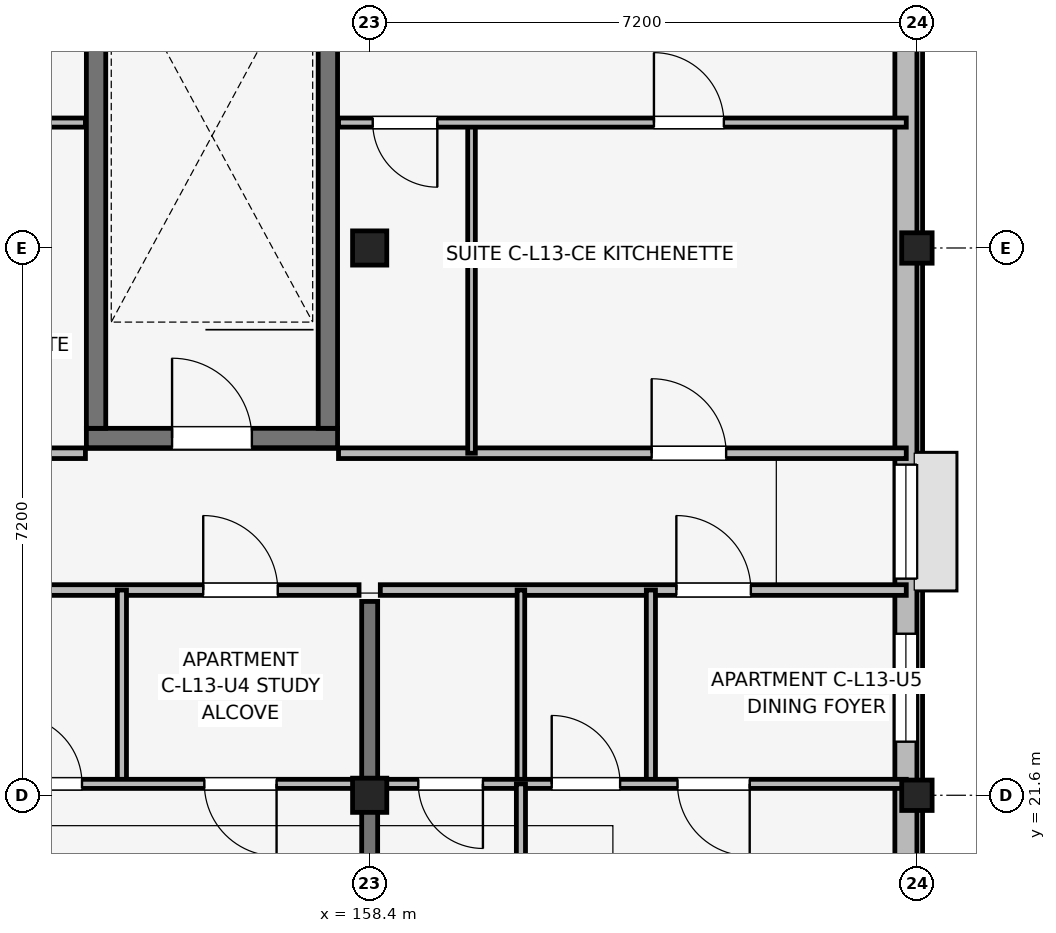
"""IFC4 building model, lengths in metres.
Left out: names, types, materials, properties, quantities, classifications, styles, units other than length and angle.
Written with IfcOpenShell. Run it as: python <this file> out.ifc"""

import sys

from ifc_helpers import new_model, si_unit, direction, frame, frame_2d, origin, origin_2d, place, context, subcontext, project, spatial, rectangle, extrude, element, fill, save


model = new_model("IFC4")
c1 = context("Model", 3, precision=1e-05, world=origin(), true_north=direction((0.0, 1.0)))
c2 = subcontext(c1, "Body", "Model", "MODEL_VIEW")
j1 = project(units=[si_unit("LENGTHUNIT", "METRE"), si_unit("PLANEANGLEUNIT", "RADIAN")], contexts=[c1])
p1 = place(None, origin())
s1 = spatial("IfcSite", under=j1, at=p1, CompositionType="ELEMENT")
p2 = place(p1, origin())
s2 = spatial("IfcBuilding", under=s1, at=p2, CompositionType="ELEMENT")
p3 = place(p2, frame((0.0, 0.0, 43.35)))
s3 = spatial("IfcBuildingStorey", under=s2, at=p3, CompositionType="ELEMENT", Elevation=43.35)
for number, where, z_axis, x_axis in (
    (1, (158.4, 21.6, 0.0), (0.0, 0.0, 1.0), (1.0, 0.0, 0.0)),
    (2, (158.4, 28.8, 0.0), (0.0, 0.0, 1.0), (1.0, 0.0, 0.0)),
):
    element("IfcColumn", number, at=place(p3, frame(where, z_axis=z_axis, x_axis=x_axis)), inside=s3, PredefinedType="COLUMN", context=c2, shape_type="SweptSolid", body=[
        extrude(rectangle(XDim=0.45, YDim=0.45, at=origin_2d()), origin(), (0.0, 0.0, 1.0), 3.15),
    ])
for number, where, z_axis, x_axis in (
    (3, (165.6, 21.6, 0.0), (0.0, 0.0, 1.0), (1.0, 0.0, 0.0)),
    (4, (165.6, 28.8, 0.0), (0.0, 0.0, 1.0), (1.0, 0.0, 0.0)),
):
    element("IfcColumn", number, at=place(p3, frame(where, z_axis=z_axis, x_axis=x_axis)), inside=s3, PredefinedType="COLUMN", context=c2, shape_type="SweptSolid", body=[
        extrude(rectangle(XDim=0.4, YDim=0.4, at=origin_2d()), origin(), (0.0, 0.0, 1.0), 3.15),
    ])
p4 = place(p3, frame((154.673, 26.3, 0.0), z_axis=(0.0, 0.0, 1.0), x_axis=(1.0, 0.0, 0.0)))
e5 = element("IfcWall", 5, at=p4, inside=s3, PredefinedType="SHEAR", context=c2, shape_type="SweptSolid", body=[
    extrude(rectangle(XDim=3.305, YDim=0.255, at=frame_2d((1.652, 0.0))), origin(), (0.0, 0.0, 1.0), 3.15),
])
p5 = place(p4, frame((1.127, 0.0, 0.0)))
e6 = element("IfcOpeningElement", 6, at=p5, cuts=e5, PredefinedType="OPENING", context=c2, shape_type="SweptSolid", body=[
    extrude(rectangle(XDim=1.05, YDim=2.12, at=frame_2d((0.525, 1.06))), frame((0.0, 0.137, 0.0), z_axis=(0.0, -1.0, 0.0), x_axis=(1.0, 0.0, 0.0)), (0.0, 0.0, 1.0), 0.275),
])
for number, where, z_axis, x_axis in (
    (7, (154.8, 26.427, 0.0), (0.0, 0.0, 1.0), (0.0, 1.0, 0.0)),
    (8, (157.85, 26.427, 0.0), (0.0, 0.0, 1.0), (0.0, 1.0, 0.0)),
):
    element("IfcWall", number, at=place(p3, frame(where, z_axis=z_axis, x_axis=x_axis)), inside=s3, PredefinedType="SHEAR", context=c2, shape_type="SweptSolid", body=[
        extrude(rectangle(XDim=6.295, YDim=0.255, at=frame_2d((3.147, 0.0))), origin(), (0.0, 0.0, 1.0), 3.15),
    ])
p6 = place(p3, frame((158.4, 17.75, 0.0), z_axis=(0.0, 0.0, 1.0), x_axis=(0.0, 1.0, 0.0)))
e9 = element("IfcWall", 9, at=p6, inside=s3, PredefinedType="SHEAR", context=c2, shape_type="SweptSolid", body=[
    extrude(rectangle(XDim=6.4, YDim=0.21, at=frame_2d((3.2, 0.0))), origin(), (0.0, 0.0, 1.0), 3.15),
])
p7 = place(p3, frame((165.455, 19.6, 0.0), z_axis=(0.0, 0.0, 1.0), x_axis=(0.0, 1.0, 0.0)))
e10 = element("IfcWall", 10, at=p7, inside=s3, PredefinedType="SOLIDWALL", context=c2, shape_type="SweptSolid", body=[
    extrude(rectangle(XDim=14.2, YDim=0.29, at=frame_2d((7.1, 0.0))), origin(), (0.0, 0.0, 1.0), 2.51),
])
p8 = place(p7, frame((4.85, 0.0, 1.05)))
e11 = element("IfcOpeningElement", 11, at=p8, cuts=e10, PredefinedType="OPENING", context=c2, shape_type="SweptSolid", body=[
    extrude(rectangle(XDim=1.5, YDim=1.15, at=frame_2d((0.75, 0.575))), frame((0.0, 0.155, 0.0), z_axis=(0.0, -1.0, 0.0), x_axis=(1.0, 0.0, 0.0)), (0.0, 0.0, 1.0), 0.31),
])
p9 = place(p7, frame((2.705, 0.0, 0.75)))
e12 = element("IfcOpeningElement", 12, at=p9, cuts=e10, PredefinedType="OPENING", context=c2, shape_type="SweptSolid", body=[
    extrude(rectangle(XDim=1.42, YDim=1.6, at=frame_2d((0.71, 0.8))), frame((0.0, 0.155, 0.0), z_axis=(0.0, -1.0, 0.0), x_axis=(1.0, 0.0, 0.0)), (0.0, 0.0, 1.0), 0.31),
])
p10 = place(p3, frame((151.34, 24.3, 0.0), z_axis=(0.0, 0.0, 1.0), x_axis=(1.0, 0.0, 0.0)))
e13 = element("IfcWall", 13, at=p10, inside=s3, PredefinedType="PARTITIONING", context=c2, shape_type="SweptSolid", body=[
    extrude(rectangle(XDim=6.92, YDim=0.14, at=frame_2d((3.46, 0.0))), origin(), (0.0, 0.0, 1.0), 2.38),
])
p11 = place(p10, frame((4.87, 0.0, 0.0)))
e14 = element("IfcOpeningElement", 14, at=p11, cuts=e13, PredefinedType="OPENING", context=c2, shape_type="SweptSolid", body=[
    extrude(rectangle(XDim=0.98, YDim=2.1, at=frame_2d((0.49, 1.05))), frame((0.0, 0.08, 0.0), z_axis=(0.0, -1.0, 0.0), x_axis=(1.0, 0.0, 0.0)), (0.0, 0.0, 1.0), 0.16),
])
p12 = place(p3, frame((155.14, 21.75, 0.0), z_axis=(0.0, 0.0, 1.0), x_axis=(0.0, 1.0, 0.0)))
e15 = element("IfcWall", 15, at=p12, inside=s3, PredefinedType="PARTITIONING", context=c2, shape_type="SweptSolid", body=[
    extrude(rectangle(XDim=2.55, YDim=0.12, at=frame_2d((1.275, 0.0))), origin(), (0.0, 0.0, 1.0), 2.38),
])
p13 = place(p3, frame((151.34, 21.75, 0.0), z_axis=(0.0, 0.0, 1.0), x_axis=(1.0, 0.0, 0.0)))
e16 = element("IfcWall", 16, at=p13, inside=s3, PredefinedType="PARTITIONING", context=c2, shape_type="SweptSolid", body=[
    extrude(rectangle(XDim=6.92, YDim=0.12, at=frame_2d((3.46, 0.0))), origin(), (0.0, 0.0, 1.0), 2.38),
])
p14 = place(p13, frame((1.35, 0.0, 0.0), z_axis=(0.0, 0.0, 1.0), x_axis=(-1.0, 0.0, 0.0)))
e17 = element("IfcOpeningElement", 17, at=p14, cuts=e16, PredefinedType="OPENING", context=c2, shape_type="SweptSolid", body=[
    extrude(rectangle(XDim=0.85, YDim=2.08, at=frame_2d((0.425, 1.04))), frame((0.0, 0.07, 0.0), z_axis=(0.0, -1.0, 0.0), x_axis=(1.0, 0.0, 0.0)), (0.0, 0.0, 1.0), 0.14),
])
p15 = place(p13, frame((2.375, 0.0, 0.0)))
e18 = element("IfcOpeningElement", 18, at=p15, cuts=e16, PredefinedType="OPENING", context=c2, shape_type="SweptSolid", body=[
    extrude(rectangle(XDim=0.9, YDim=2.08, at=frame_2d((0.45, 1.04))), frame((0.0, 0.07, 0.0), z_axis=(0.0, -1.0, 0.0), x_axis=(1.0, 0.0, 0.0)), (0.0, 0.0, 1.0), 0.14),
])
p16 = place(p13, frame((5.835, 0.0, 0.0), z_axis=(0.0, 0.0, 1.0), x_axis=(-1.0, 0.0, 0.0)))
e19 = element("IfcOpeningElement", 19, at=p16, cuts=e16, PredefinedType="OPENING", context=c2, shape_type="SweptSolid", body=[
    extrude(rectangle(XDim=0.95, YDim=2.08, at=frame_2d((0.475, 1.04))), frame((0.0, 0.07, 0.0), z_axis=(0.0, -1.0, 0.0), x_axis=(1.0, 0.0, 0.0)), (0.0, 0.0, 1.0), 0.14),
])
p17 = place(p3, frame((158.54, 24.3, 0.0), z_axis=(0.0, 0.0, 1.0), x_axis=(1.0, 0.0, 0.0)))
e20 = element("IfcWall", 20, at=p17, inside=s3, PredefinedType="PARTITIONING", context=c2, shape_type="SweptSolid", body=[
    extrude(rectangle(XDim=6.92, YDim=0.14, at=frame_2d((3.46, 0.0))), origin(), (0.0, 0.0, 1.0), 2.38),
])
p18 = place(p17, frame((3.895, 0.0, 0.0)))
e21 = element("IfcOpeningElement", 21, at=p18, cuts=e20, PredefinedType="OPENING", context=c2, shape_type="SweptSolid", body=[
    extrude(rectangle(XDim=0.98, YDim=2.1, at=frame_2d((0.49, 1.05))), frame((0.0, 0.08, 0.0), z_axis=(0.0, -1.0, 0.0), x_axis=(1.0, 0.0, 0.0)), (0.0, 0.0, 1.0), 0.16),
])
p19 = place(p3, frame((160.39, 21.75, 0.0), z_axis=(0.0, 0.0, 1.0), x_axis=(0.0, 1.0, 0.0)))
e22 = element("IfcWall", 22, at=p19, inside=s3, PredefinedType="PARTITIONING", context=c2, shape_type="SweptSolid", body=[
    extrude(rectangle(XDim=2.55, YDim=0.1, at=frame_2d((1.275, 0.0))), origin(), (0.0, 0.0, 1.0), 2.38),
])
p20 = place(p3, frame((162.1, 21.75, 0.0), z_axis=(0.0, 0.0, 1.0), x_axis=(0.0, 1.0, 0.0)))
e23 = element("IfcWall", 23, at=p20, inside=s3, PredefinedType="PARTITIONING", context=c2, shape_type="SweptSolid", body=[
    extrude(rectangle(XDim=2.55, YDim=0.12, at=frame_2d((1.275, 0.0))), origin(), (0.0, 0.0, 1.0), 2.38),
])
p21 = place(p3, frame((158.54, 21.75, 0.0), z_axis=(0.0, 0.0, 1.0), x_axis=(1.0, 0.0, 0.0)))
e24 = element("IfcWall", 24, at=p21, inside=s3, PredefinedType="PARTITIONING", context=c2, shape_type="SweptSolid", body=[
    extrude(rectangle(XDim=6.92, YDim=0.12, at=frame_2d((3.46, 0.0))), origin(), (0.0, 0.0, 1.0), 2.38),
])
p22 = place(p21, frame((1.35, 0.0, 0.0), z_axis=(0.0, 0.0, 1.0), x_axis=(-1.0, 0.0, 0.0)))
e25 = element("IfcOpeningElement", 25, at=p22, cuts=e24, PredefinedType="OPENING", context=c2, shape_type="SweptSolid", body=[
    extrude(rectangle(XDim=0.85, YDim=2.08, at=frame_2d((0.425, 1.04))), frame((0.0, 0.07, 0.0), z_axis=(0.0, -1.0, 0.0), x_axis=(1.0, 0.0, 0.0)), (0.0, 0.0, 1.0), 0.14),
])
p23 = place(p21, frame((2.255, 0.0, 0.0)))
e26 = element("IfcOpeningElement", 26, at=p23, cuts=e24, PredefinedType="OPENING", context=c2, shape_type="SweptSolid", body=[
    extrude(rectangle(XDim=0.9, YDim=2.08, at=frame_2d((0.45, 1.04))), frame((0.0, 0.07, 0.0), z_axis=(0.0, -1.0, 0.0), x_axis=(1.0, 0.0, 0.0)), (0.0, 0.0, 1.0), 0.14),
])
p24 = place(p21, frame((4.86, 0.0, 0.0), z_axis=(0.0, 0.0, 1.0), x_axis=(-1.0, 0.0, 0.0)))
e27 = element("IfcOpeningElement", 27, at=p24, cuts=e24, PredefinedType="OPENING", context=c2, shape_type="SweptSolid", body=[
    extrude(rectangle(XDim=0.95, YDim=2.08, at=frame_2d((0.475, 1.04))), frame((0.0, 0.07, 0.0), z_axis=(0.0, -1.0, 0.0), x_axis=(1.0, 0.0, 0.0)), (0.0, 0.0, 1.0), 0.14),
])
p25 = place(p3, frame((160.39, 17.7, 0.0), z_axis=(0.0, 0.0, 1.0), x_axis=(0.0, 1.0, 0.0)))
e28 = element("IfcWall", 28, at=p25, inside=s3, PredefinedType="PARTITIONING", context=c2, shape_type="SweptSolid", body=[
    extrude(rectangle(XDim=4.05, YDim=0.12, at=frame_2d((2.025, 0.0))), origin(), (0.0, 0.0, 1.0), 2.38),
])
p26 = place(p25, frame((1.575, 0.0, 0.0)))
e29 = element("IfcOpeningElement", 29, at=p26, cuts=e28, PredefinedType="OPENING", context=c2, shape_type="SweptSolid", body=[
    extrude(rectangle(XDim=0.9, YDim=2.08, at=frame_2d((0.45, 1.04))), frame((0.0, 0.07, 0.0), z_axis=(0.0, -1.0, 0.0), x_axis=(1.0, 0.0, 0.0)), (0.0, 0.0, 1.0), 0.14),
])
p27 = place(p3, frame((150.94, 26.1, 0.0), z_axis=(0.0, 0.0, 1.0), x_axis=(1.0, 0.0, 0.0)))
e30 = element("IfcWall", 30, at=p27, inside=s3, PredefinedType="PARTITIONING", context=c2, shape_type="SweptSolid", body=[
    extrude(rectangle(XDim=3.72, YDim=0.14, at=frame_2d((1.86, 0.0))), origin(), (0.0, 0.0, 1.0), 2.38),
])
p28 = place(p27, frame((3.131, 0.0, 0.0), z_axis=(0.0, 0.0, 1.0), x_axis=(-1.0, 0.0, 0.0)))
e31 = element("IfcOpeningElement", 31, at=p28, cuts=e30, PredefinedType="OPENING", context=c2, shape_type="SweptSolid", body=[
    extrude(rectangle(XDim=0.98, YDim=2.1, at=frame_2d((0.49, 1.05))), frame((0.0, 0.08, 0.0), z_axis=(0.0, -1.0, 0.0), x_axis=(1.0, 0.0, 0.0)), (0.0, 0.0, 1.0), 0.16),
])
p29 = place(p3, frame((150.94, 30.45, 0.0), z_axis=(0.0, 0.0, 1.0), x_axis=(1.0, 0.0, 0.0)))
e32 = element("IfcWall", 32, at=p29, inside=s3, PredefinedType="PARTITIONING", context=c2, shape_type="SweptSolid", body=[
    extrude(rectangle(XDim=3.72, YDim=0.12, at=frame_2d((1.86, 0.0))), origin(), (0.0, 0.0, 1.0), 2.38),
])
p30 = place(p29, frame((0.356, 0.0, 0.0)))
e33 = element("IfcOpeningElement", 33, at=p30, cuts=e32, PredefinedType="OPENING", context=c2, shape_type="SweptSolid", body=[
    extrude(rectangle(XDim=0.85, YDim=2.08, at=frame_2d((0.425, 1.04))), frame((0.0, 0.07, 0.0), z_axis=(0.0, -1.0, 0.0), x_axis=(1.0, 0.0, 0.0)), (0.0, 0.0, 1.0), 0.14),
])
p31 = place(p29, frame((3.101, 0.0, 0.0), z_axis=(0.0, 0.0, 1.0), x_axis=(-1.0, 0.0, 0.0)))
e34 = element("IfcOpeningElement", 34, at=p31, cuts=e32, PredefinedType="OPENING", context=c2, shape_type="SweptSolid", body=[
    extrude(rectangle(XDim=0.92, YDim=2.08, at=frame_2d((0.46, 1.04))), frame((0.0, 0.07, 0.0), z_axis=(0.0, -1.0, 0.0), x_axis=(1.0, 0.0, 0.0)), (0.0, 0.0, 1.0), 0.14),
])
p32 = place(p3, frame((157.99, 26.1, 0.0), z_axis=(0.0, 0.0, 1.0), x_axis=(1.0, 0.0, 0.0)))
e35 = element("IfcWall", 35, at=p32, inside=s3, PredefinedType="PARTITIONING", context=c2, shape_type="SweptSolid", body=[
    extrude(rectangle(XDim=7.47, YDim=0.14, at=frame_2d((3.735, 0.0))), origin(), (0.0, 0.0, 1.0), 2.38),
])
p33 = place(p32, frame((4.12, 0.0, 0.0)))
e36 = element("IfcOpeningElement", 36, at=p33, cuts=e35, PredefinedType="OPENING", context=c2, shape_type="SweptSolid", body=[
    extrude(rectangle(XDim=0.98, YDim=2.1, at=frame_2d((0.49, 1.05))), frame((0.0, 0.08, 0.0), z_axis=(0.0, -1.0, 0.0), x_axis=(1.0, 0.0, 0.0)), (0.0, 0.0, 1.0), 0.16),
])
p34 = place(p3, frame((159.74, 26.1, 0.0), z_axis=(0.0, 0.0, 1.0), x_axis=(0.0, 1.0, 0.0)))
e37 = element("IfcWall", 37, at=p34, inside=s3, PredefinedType="PARTITIONING", context=c2, shape_type="SweptSolid", body=[
    extrude(rectangle(XDim=4.35, YDim=0.1, at=frame_2d((2.175, 0.0))), origin(), (0.0, 0.0, 1.0), 2.38),
])
p35 = place(p3, frame((157.99, 30.45, 0.0), z_axis=(0.0, 0.0, 1.0), x_axis=(1.0, 0.0, 0.0)))
e38 = element("IfcWall", 38, at=p35, inside=s3, PredefinedType="PARTITIONING", context=c2, shape_type="SweptSolid", body=[
    extrude(rectangle(XDim=7.47, YDim=0.12, at=frame_2d((3.735, 0.0))), origin(), (0.0, 0.0, 1.0), 2.38),
])
p36 = place(p35, frame((1.3, 0.0, 0.0), z_axis=(0.0, 0.0, 1.0), x_axis=(-1.0, 0.0, 0.0)))
e39 = element("IfcOpeningElement", 39, at=p36, cuts=e38, PredefinedType="OPENING", context=c2, shape_type="SweptSolid", body=[
    extrude(rectangle(XDim=0.85, YDim=2.08, at=frame_2d((0.425, 1.04))), frame((0.0, 0.07, 0.0), z_axis=(0.0, -1.0, 0.0), x_axis=(1.0, 0.0, 0.0)), (0.0, 0.0, 1.0), 0.14),
])
p37 = place(p35, frame((4.15, 0.0, 0.0)))
e40 = element("IfcOpeningElement", 40, at=p37, cuts=e38, PredefinedType="OPENING", context=c2, shape_type="SweptSolid", body=[
    extrude(rectangle(XDim=0.92, YDim=2.08, at=frame_2d((0.46, 1.04))), frame((0.0, 0.07, 0.0), z_axis=(0.0, -1.0, 0.0), x_axis=(1.0, 0.0, 0.0)), (0.0, 0.0, 1.0), 0.14),
])
p38 = place(p8, origin())
e41 = element("IfcWindow", 41, at=p38, inside=s3, PartitioningType="SINGLE_PANEL", PredefinedType="WINDOW", context=c2, shape_type="SweptSolid", body=[
    extrude(rectangle(XDim=1.5, YDim=1.15, at=frame_2d((0.75, 0.575))), frame((0.0, 0.03, 0.0), z_axis=(0.0, -1.0, 0.0), x_axis=(1.0, 0.0, 0.0)), (0.0, 0.0, 1.0), 0.06),
])
fill(e11, e41)
p39 = place(p9, origin())
e42 = element("IfcWindow", 42, at=p39, inside=s3, PartitioningType="SINGLE_PANEL", PredefinedType="WINDOW", context=c2, shape_type="SweptSolid", body=[
    extrude(rectangle(XDim=1.42, YDim=1.6, at=frame_2d((0.71, 0.8))), frame((0.0, 0.03, 0.0), z_axis=(0.0, -1.0, 0.0), x_axis=(1.0, 0.0, 0.0)), (0.0, 0.0, 1.0), 0.06),
])
fill(e12, e42)
p40 = place(p11, origin())
e43 = element("IfcDoor", 43, at=p40, inside=s3, OperationType="SINGLE_SWING_LEFT", PredefinedType="DOOR", context=c2, shape_type="SweptSolid", body=[
    extrude(rectangle(XDim=0.98, YDim=2.1, at=frame_2d((0.49, 1.05))), frame((0.0, 0.025, 0.0), z_axis=(0.0, -1.0, 0.0), x_axis=(1.0, 0.0, 0.0)), (0.0, 0.0, 1.0), 0.05),
])
fill(e14, e43)
p41 = place(p15, origin())
e44 = element("IfcDoor", 44, at=p41, inside=s3, OperationType="SINGLE_SWING_LEFT", PredefinedType="DOOR", context=c2, shape_type="SweptSolid", body=[
    extrude(rectangle(XDim=0.9, YDim=2.08, at=frame_2d((0.45, 1.04))), frame((0.0, 0.025, 0.0), z_axis=(0.0, -1.0, 0.0), x_axis=(1.0, 0.0, 0.0)), (0.0, 0.0, 1.0), 0.05),
])
fill(e18, e44)
p42 = place(p16, origin())
e45 = element("IfcDoor", 45, at=p42, inside=s3, OperationType="SINGLE_SWING_RIGHT", PredefinedType="DOOR", context=c2, shape_type="SweptSolid", body=[
    extrude(rectangle(XDim=0.95, YDim=2.08, at=frame_2d((0.475, 1.04))), frame((0.0, 0.025, 0.0), z_axis=(0.0, -1.0, 0.0), x_axis=(1.0, 0.0, 0.0)), (0.0, 0.0, 1.0), 0.05),
])
fill(e19, e45)
p43 = place(p18, origin())
e46 = element("IfcDoor", 46, at=p43, inside=s3, OperationType="SINGLE_SWING_LEFT", PredefinedType="DOOR", context=c2, shape_type="SweptSolid", body=[
    extrude(rectangle(XDim=0.98, YDim=2.1, at=frame_2d((0.49, 1.05))), frame((0.0, 0.025, 0.0), z_axis=(0.0, -1.0, 0.0), x_axis=(1.0, 0.0, 0.0)), (0.0, 0.0, 1.0), 0.05),
])
fill(e21, e46)
p44 = place(p22, origin())
e47 = element("IfcDoor", 47, at=p44, inside=s3, OperationType="SINGLE_SWING_RIGHT", PredefinedType="DOOR", context=c2, shape_type="SweptSolid", body=[
    extrude(rectangle(XDim=0.85, YDim=2.08, at=frame_2d((0.425, 1.04))), frame((0.0, 0.025, 0.0), z_axis=(0.0, -1.0, 0.0), x_axis=(1.0, 0.0, 0.0)), (0.0, 0.0, 1.0), 0.05),
])
fill(e25, e47)
p45 = place(p23, origin())
e48 = element("IfcDoor", 48, at=p45, inside=s3, OperationType="SINGLE_SWING_LEFT", PredefinedType="DOOR", context=c2, shape_type="SweptSolid", body=[
    extrude(rectangle(XDim=0.9, YDim=2.08, at=frame_2d((0.45, 1.04))), frame((0.0, 0.025, 0.0), z_axis=(0.0, -1.0, 0.0), x_axis=(1.0, 0.0, 0.0)), (0.0, 0.0, 1.0), 0.05),
])
fill(e26, e48)
p46 = place(p24, origin())
e49 = element("IfcDoor", 49, at=p46, inside=s3, OperationType="SINGLE_SWING_RIGHT", PredefinedType="DOOR", context=c2, shape_type="SweptSolid", body=[
    extrude(rectangle(XDim=0.95, YDim=2.08, at=frame_2d((0.475, 1.04))), frame((0.0, 0.025, 0.0), z_axis=(0.0, -1.0, 0.0), x_axis=(1.0, 0.0, 0.0)), (0.0, 0.0, 1.0), 0.05),
])
fill(e27, e49)
p47 = place(p33, origin())
e50 = element("IfcDoor", 50, at=p47, inside=s3, OperationType="SINGLE_SWING_LEFT", PredefinedType="DOOR", context=c2, shape_type="SweptSolid", body=[
    extrude(rectangle(XDim=0.98, YDim=2.1, at=frame_2d((0.49, 1.05))), frame((0.0, 0.025, 0.0), z_axis=(0.0, -1.0, 0.0), x_axis=(1.0, 0.0, 0.0)), (0.0, 0.0, 1.0), 0.05),
])
fill(e36, e50)
p48 = place(p36, origin())
e51 = element("IfcDoor", 51, at=p48, inside=s3, OperationType="SINGLE_SWING_RIGHT", PredefinedType="DOOR", context=c2, shape_type="SweptSolid", body=[
    extrude(rectangle(XDim=0.85, YDim=2.08, at=frame_2d((0.425, 1.04))), frame((0.0, 0.025, 0.0), z_axis=(0.0, -1.0, 0.0), x_axis=(1.0, 0.0, 0.0)), (0.0, 0.0, 1.0), 0.05),
])
fill(e39, e51)
p49 = place(p37, origin())
e52 = element("IfcDoor", 52, at=p49, inside=s3, OperationType="SINGLE_SWING_LEFT", PredefinedType="DOOR", context=c2, shape_type="SweptSolid", body=[
    extrude(rectangle(XDim=0.92, YDim=2.08, at=frame_2d((0.46, 1.04))), frame((0.0, 0.025, 0.0), z_axis=(0.0, -1.0, 0.0), x_axis=(1.0, 0.0, 0.0)), (0.0, 0.0, 1.0), 0.05),
])
fill(e40, e52)
p50 = place(p5, origin())
e53 = element("IfcDoor", 53, at=p50, inside=s3, OperationType="SINGLE_SWING_LEFT", PredefinedType="DOOR", context=c2, shape_type="SweptSolid", body=[
    extrude(rectangle(XDim=1.05, YDim=2.12, at=frame_2d((0.525, 1.06))), frame((0.0, 0.025, 0.0), z_axis=(0.0, -1.0, 0.0), x_axis=(1.0, 0.0, 0.0)), (0.0, 0.0, 1.0), 0.05),
])
fill(e6, e53)
save(model, sys.argv[1])
